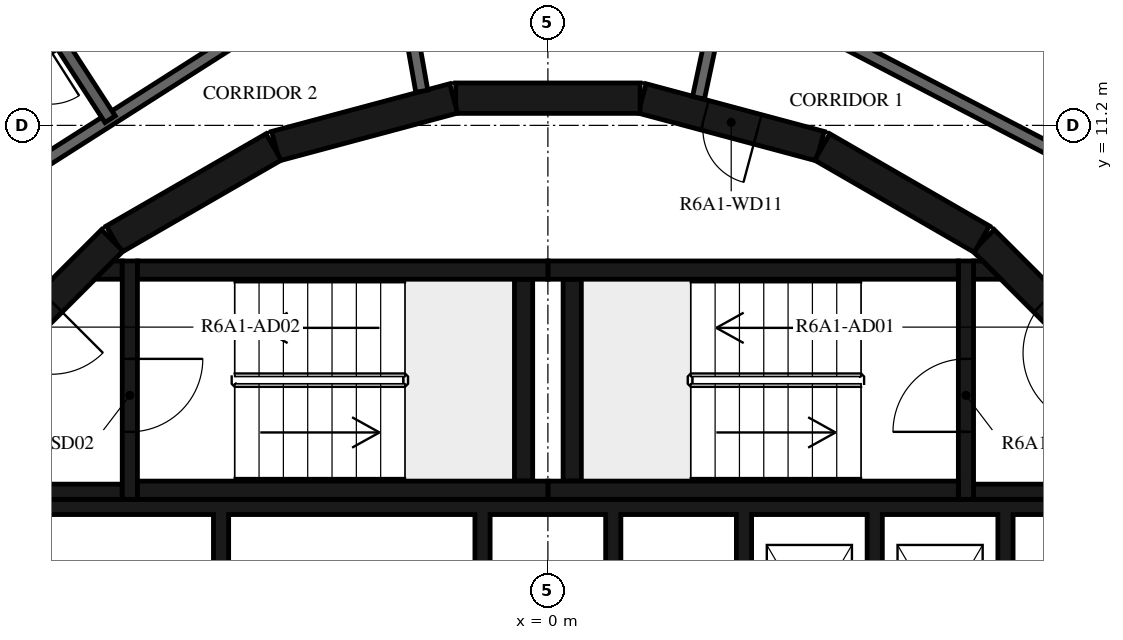
"""IFC4 building model, lengths in metres.
Left out: names, types, materials, properties, quantities, classifications, styles, units other than length and angle.
Written with IfcOpenShell. Run it as: python <this file> out.ifc"""

import sys

from ifc_helpers import new_model, si_unit, direction, frame, frame_2d, origin, place, context, subcontext, project, spatial, polyline, rectangle, outline, extrude, element, fill, save


model = new_model("IFC4")
c1 = context("Model", 3, precision=1e-05, world=origin(), true_north=direction((0.0, 1.0)))
c2 = subcontext(c1, "Body", "Model", "MODEL_VIEW")
j1 = project(units=[si_unit("LENGTHUNIT", "METRE"), si_unit("PLANEANGLEUNIT", "RADIAN")], contexts=[c1])
p1 = place(None, origin())
s1 = spatial("IfcSite", under=j1, at=p1, CompositionType="ELEMENT")
p2 = place(p1, origin())
s2 = spatial("IfcBuilding", under=s1, at=p2, CompositionType="ELEMENT")
p3 = place(p2, frame((0.0, 0.0, 230.2)))
s3 = spatial("IfcBuildingStorey", under=s2, at=p3, CompositionType="ELEMENT", Elevation=230.2)
p4 = place(p3, frame((9.308, 7.164, 0.0), z_axis=(0.0, 0.0, 1.0), x_axis=(-0.707106781187, 0.707106781187, 0.0)))
e1 = element("IfcWall", 1, at=p4, inside=s3, PredefinedType="SHEAR", context=c2, shape_type="SweptSolid", body=[
    extrude(rectangle(XDim=3.032, YDim=0.5, at=frame_2d((1.516, 0.0))), origin(), (0.0, 0.0, 1.0), 3.12),
])
p5 = place(p4, frame((0.416, 0.0, 0.0)))
e2 = element("IfcOpeningElement", 2, at=p5, cuts=e1, PredefinedType="OPENING", context=c2, shape_type="SweptSolid", body=[
    extrude(rectangle(XDim=1.2, YDim=2.1, at=frame_2d((0.6, 1.05))), frame((0.0, 0.26, 0.0), z_axis=(0.0, -1.0, 0.0), x_axis=(1.0, 0.0, 0.0)), (0.0, 0.0, 1.0), 0.52),
])
p6 = place(p3, frame((7.137, 9.329, 0.0), z_axis=(0.0, 0.0, 1.0), x_axis=(-0.865975092491, 0.500087131594, 0.0)))
e3 = element("IfcWall", 3, at=p6, inside=s3, PredefinedType="SHEAR", context=c2, shape_type="SweptSolid", body=[
    extrude(rectangle(XDim=3.033, YDim=0.5, at=frame_2d((1.516, 0.0))), origin(), (0.0, 0.0, 1.0), 3.12),
])
p7 = place(p3, frame((4.479, 10.858, 0.0), z_axis=(0.0, 0.0, 1.0), x_axis=(-0.965948410781, 0.258734743916, 0.0)))
e4 = element("IfcWall", 4, at=p7, inside=s3, PredefinedType="SHEAR", context=c2, shape_type="SweptSolid", body=[
    extrude(rectangle(XDim=3.033, YDim=0.5, at=frame_2d((1.516, 0.0))), origin(), (0.0, 0.0, 1.0), 3.12),
])
p8 = place(p7, frame((1.066, 0.0, 0.0)))
e5 = element("IfcOpeningElement", 5, at=p8, cuts=e4, PredefinedType="OPENING", context=c2, shape_type="SweptSolid", body=[
    extrude(rectangle(XDim=0.9, YDim=2.1, at=frame_2d((0.45, 1.05))), frame((0.0, 0.26, 0.0), z_axis=(0.0, -1.0, 0.0), x_axis=(1.0, 0.0, 0.0)), (0.0, 0.0, 1.0), 0.52),
])
for number, where, z_axis, x_axis in (
    (6, (1.516, 11.647, 0.0), (0.0, 0.0, 1.0), (-1.0, 0.0, 0.0)),
    (7, (-1.55, 11.643, 0.0), (0.0, 0.0, 1.0), (-0.966, -0.259, 0.0)),
    (8, (-4.51, 10.845, 0.0), (0.0, 0.0, 1.0), (-0.866, -0.5, 0.0)),
):
    element("IfcWall", number, at=place(p3, frame(where, z_axis=z_axis, x_axis=x_axis)), inside=s3, PredefinedType="SHEAR", context=c2, shape_type="SweptSolid", body=[
        extrude(rectangle(XDim=3.033, YDim=0.5, at=frame_2d((1.516, 0.0))), origin(), (0.0, 0.0, 1.0), 3.12),
    ])
p9 = place(p3, frame((-7.164, 9.308, 0.0), z_axis=(0.0, 0.0, 1.0), x_axis=(-0.707106781187, -0.707106781187, 0.0)))
e9 = element("IfcWall", 9, at=p9, inside=s3, PredefinedType="SHEAR", context=c2, shape_type="SweptSolid", body=[
    extrude(rectangle(XDim=3.032, YDim=0.5, at=frame_2d((1.516, 0.0))), origin(), (0.0, 0.0, 1.0), 3.12),
])
p10 = place(p9, frame((1.416, 0.0, 0.0)))
e10 = element("IfcOpeningElement", 10, at=p10, cuts=e9, PredefinedType="OPENING", context=c2, shape_type="SweptSolid", body=[
    extrude(rectangle(XDim=1.2, YDim=2.1, at=frame_2d((0.6, 1.05))), frame((0.0, 0.26, 0.0), z_axis=(0.0, -1.0, 0.0), x_axis=(1.0, 0.0, 0.0)), (0.0, 0.0, 1.0), 0.52),
])
for number, where, z_axis, x_axis in (
    (11, (0.0, 5.2, 0.0), (0.0, 0.0, 1.0), (1.0, 0.0, 0.0)),
    (12, (0.0, 8.82, 0.0), (0.0, 0.0, 1.0), (1.0, 0.0, 0.0)),
):
    element("IfcWall", number, at=place(p3, frame(where, z_axis=z_axis, x_axis=x_axis)), inside=s3, PredefinedType="SHEAR", context=c2, shape_type="SweptSolid", body=[
        extrude(rectangle(XDim=6.75, YDim=0.3, at=frame_2d((3.375, 0.0))), origin(), (0.0, 0.0, 1.0), 3.12),
    ])
p11 = place(p3, frame((0.4, 5.35, 0.0), z_axis=(0.0, 0.0, 1.0), x_axis=(0.0, 1.0, 0.0)))
e13 = element("IfcWall", 13, at=p11, inside=s3, PredefinedType="SHEAR", context=c2, shape_type="SweptSolid", body=[
    extrude(rectangle(XDim=3.32, YDim=0.3, at=frame_2d((1.66, 0.0))), origin(), (0.0, 0.0, 1.0), 3.12),
])
p12 = place(p3, frame((6.875, 5.05, 0.0), z_axis=(0.0, 0.0, 1.0), x_axis=(0.0, 1.0, 0.0)))
e14 = element("IfcWall", 14, at=p12, inside=s3, PredefinedType="SHEAR", context=c2, shape_type="SweptSolid", body=[
    extrude(rectangle(XDim=3.92, YDim=0.25, at=frame_2d((1.96, 0.0))), origin(), (0.0, 0.0, 1.0), 3.12),
])
p13 = place(p12, frame((1.11, 0.0, 0.0)))
e15 = element("IfcOpeningElement", 15, at=p13, cuts=e14, PredefinedType="OPENING", context=c2, shape_type="SweptSolid", body=[
    extrude(rectangle(XDim=1.2, YDim=2.1, at=frame_2d((0.6, 1.05))), frame((0.0, 0.135, 0.0), z_axis=(0.0, -1.0, 0.0), x_axis=(1.0, 0.0, 0.0)), (0.0, 0.0, 1.0), 0.27),
])
p14 = place(p3, frame((7.0, 5.175, 0.0), z_axis=(0.0, 0.0, 1.0), x_axis=(1.0, 0.0, 0.0)))
e16 = element("IfcWall", 16, at=p14, inside=s3, PredefinedType="SHEAR", context=c2, shape_type="SweptSolid", body=[
    extrude(rectangle(XDim=3.1, YDim=0.25, at=frame_2d((1.55, 0.0))), origin(), (0.0, 0.0, 1.0), 3.12),
])
p15 = place(p3, origin())
e17 = element("IfcWall", 17, at=p15, inside=s3, PredefinedType="SHEAR", context=c2, shape_type="SweptSolid", body=[
    extrude(outline(polyline([(7.448, 8.67), (7.0, 8.67), (7.0, 8.97), (7.148, 8.97), (7.448, 8.67)])), origin(), (0.0, 0.0, 1.0), 3.12),
])
for number, where, z_axis, x_axis in (
    (18, (-6.75, 5.2, 0.0), (0.0, 0.0, 1.0), (1.0, 0.0, 0.0)),
    (19, (-6.75, 8.82, 0.0), (0.0, 0.0, 1.0), (1.0, 0.0, 0.0)),
):
    element("IfcWall", number, at=place(p3, frame(where, z_axis=z_axis, x_axis=x_axis)), inside=s3, PredefinedType="SHEAR", context=c2, shape_type="SweptSolid", body=[
        extrude(rectangle(XDim=6.75, YDim=0.3, at=frame_2d((3.375, 0.0))), origin(), (0.0, 0.0, 1.0), 3.12),
    ])
p16 = place(p3, frame((-0.4, 5.35, 0.0), z_axis=(0.0, 0.0, 1.0), x_axis=(0.0, 1.0, 0.0)))
e20 = element("IfcWall", 20, at=p16, inside=s3, PredefinedType="SHEAR", context=c2, shape_type="SweptSolid", body=[
    extrude(rectangle(XDim=3.32, YDim=0.3, at=frame_2d((1.66, 0.0))), origin(), (0.0, 0.0, 1.0), 3.12),
])
p17 = place(p3, frame((-6.875, 8.97, 0.0), z_axis=(0.0, 0.0, 1.0), x_axis=(0.0, -1.0, 0.0)))
e21 = element("IfcWall", 21, at=p17, inside=s3, PredefinedType="SHEAR", context=c2, shape_type="SweptSolid", body=[
    extrude(rectangle(XDim=3.92, YDim=0.25, at=frame_2d((1.96, 0.0))), origin(), (0.0, 0.0, 1.0), 3.12),
])
p18 = place(p17, frame((1.61, 0.0, 0.0)))
e22 = element("IfcOpeningElement", 22, at=p18, cuts=e21, PredefinedType="OPENING", context=c2, shape_type="SweptSolid", body=[
    extrude(rectangle(XDim=1.2, YDim=2.1, at=frame_2d((0.6, 1.05))), frame((0.0, 0.135, 0.0), z_axis=(0.0, -1.0, 0.0), x_axis=(1.0, 0.0, 0.0)), (0.0, 0.0, 1.0), 0.27),
])
p19 = place(p3, frame((-7.0, 5.175, 0.0), z_axis=(0.0, 0.0, 1.0), x_axis=(-1.0, 0.0, 0.0)))
e23 = element("IfcWall", 23, at=p19, inside=s3, PredefinedType="SHEAR", context=c2, shape_type="SweptSolid", body=[
    extrude(rectangle(XDim=3.1, YDim=0.25, at=frame_2d((1.55, 0.0))), origin(), (0.0, 0.0, 1.0), 3.12),
])
p20 = place(p3, origin())
e24 = element("IfcWall", 24, at=p20, inside=s3, PredefinedType="SHEAR", context=c2, shape_type="SweptSolid", body=[
    extrude(outline(polyline([(-7.148, 8.97), (-7.0, 8.97), (-7.0, 8.67), (-7.448, 8.67), (-7.148, 8.97)])), origin(), (0.0, 0.0, 1.0), 3.12),
])
p21 = place(p3, origin())
e25 = element("IfcWall", 25, at=p21, inside=s3, PredefinedType="SHEAR", context=c2, shape_type="SweptSolid", body=[
    extrude(outline(polyline([(-9.55, 4.8), (-5.5, 4.8), (-5.5, 1.9), (-5.25, 1.9), (-5.25, 4.8), (-1.2, 4.8), (-1.2, 1.9), (-0.95, 1.9), (-0.95, 4.8), (0.95, 4.8), (0.95, 1.9), (1.2, 1.9), (1.2, 4.8), (3.1, 4.8), (3.1, 1.9), (3.35, 1.9), (3.35, 4.8), (5.25, 4.8), (5.25, 1.9), (5.5, 1.9), (5.5, 4.8), (7.4, 4.8), (7.4, 1.9), (7.65, 1.9), (7.65, 4.8), (9.55, 4.8), (9.55, 1.9), (9.8, 1.9), (9.8, 4.8), (9.8, 5.05), (-9.8, 5.05), (-9.8, 4.8), (-9.8, 1.9), (-9.55, 1.9), (-9.55, 4.8)])), origin(), (0.0, 0.0, 1.0), 3.12),
])
p22 = place(p3, frame((9.372, 10.228, 0.0), z_axis=(0.0, 0.0, 1.0), x_axis=(-0.887005184532, 0.461759464021, 0.0)))
e26 = element("IfcWall", 26, at=p22, inside=s3, PredefinedType="STANDARD", context=c2, shape_type="SweptSolid", body=[
    extrude(rectangle(XDim=7.181, YDim=0.2, at=frame_2d((3.591, 0.0))), origin(), (0.0, 0.0, 1.0), 3.12),
])
p23 = place(p3, frame((2.878, 13.538, 0.0), z_axis=(0.0, 0.0, 1.0), x_axis=(-0.207893604596, -0.978151444904, 0.0)))
e27 = element("IfcWall", 27, at=p23, inside=s3, PredefinedType="STANDARD", context=c2, shape_type="SweptSolid", body=[
    extrude(rectangle(XDim=1.927, YDim=0.2, at=frame_2d((0.963, 0.0))), origin(), (0.0, 0.0, 1.0), 3.12),
])
p24 = place(p3, frame((-2.074, 11.761, 0.0), z_axis=(0.0, 0.0, 1.0), x_axis=(-0.173679082312, 0.984802303189, 0.0)))
e28 = element("IfcWall", 28, at=p24, inside=s3, PredefinedType="STANDARD", context=c2, shape_type="SweptSolid", body=[
    extrude(rectangle(XDim=1.573, YDim=0.2, at=frame_2d((0.787, 0.0))), origin(), (0.0, 0.0, 1.0), 3.12),
])
p25 = place(p3, frame((-4.172, 13.231, 0.0), z_axis=(0.0, 0.0, 1.0), x_axis=(-0.843388394728, -0.537304397561, 0.0)))
e29 = element("IfcWall", 29, at=p25, inside=s3, PredefinedType="STANDARD", context=c2, shape_type="SweptSolid", body=[
    extrude(rectangle(XDim=7.181, YDim=0.2, at=frame_2d((3.59, 0.0))), origin(), (0.0, 0.0, 1.0), 3.12),
])
p26 = place(p3, frame((-8.738, 13.677, 0.0), z_axis=(0.0, 0.0, 1.0), x_axis=(0.54358037296, -0.839357121929, 0.0)))
e30 = element("IfcWall", 30, at=p26, inside=s3, PredefinedType="STANDARD", context=c2, shape_type="SweptSolid", body=[
    extrude(rectangle(XDim=2.83, YDim=0.2, at=frame_2d((1.415, 0.0))), origin(), (0.0, 0.0, 1.0), 3.12),
])
p27 = place(p3, frame((10.421, 11.373, 0.0), z_axis=(0.0, 0.0, 1.0), x_axis=(-0.887012970857, 0.461744506769, 0.0)))
e31 = element("IfcWall", 31, at=p27, inside=s3, PredefinedType="PARTITIONING", context=c2, shape_type="SweptSolid", body=[
    extrude(rectangle(XDim=7.985, YDim=0.12, at=frame_2d((3.992, 0.0))), origin(), (0.0, 0.0, 1.0), 3.12),
])
p28 = place(p27, frame((5.448, 0.0, 0.0)))
e32 = element("IfcOpeningElement", 32, at=p28, cuts=e31, PredefinedType="OPENING", context=c2, shape_type="SweptSolid", body=[
    extrude(rectangle(XDim=0.9, YDim=2.1, at=frame_2d((0.45, 1.05))), frame((0.0, 0.07, 0.0), z_axis=(0.0, -1.0, 0.0), x_axis=(1.0, 0.0, 0.0)), (0.0, 0.0, 1.0), 0.14),
])
p29 = place(p3, frame((-8.023, 12.555, 0.0), z_axis=(0.0, 0.0, 1.0), x_axis=(-0.843408270233, -0.537273198385, 0.0)))
e33 = element("IfcWall", 33, at=p29, inside=s3, PredefinedType="PARTITIONING", context=c2, shape_type="SweptSolid", body=[
    extrude(rectangle(XDim=3.971, YDim=0.12, at=frame_2d((1.986, 0.0))), origin(), (0.0, 0.0, 1.0), 3.12),
])
p30 = place(p29, frame((0.2, 0.0, 0.0)))
e34 = element("IfcOpeningElement", 34, at=p30, cuts=e33, PredefinedType="OPENING", context=c2, shape_type="SweptSolid", body=[
    extrude(rectangle(XDim=0.9, YDim=2.1, at=frame_2d((0.45, 1.05))), frame((0.0, 0.07, 0.0), z_axis=(0.0, -1.0, 0.0), x_axis=(1.0, 0.0, 0.0)), (0.0, 0.0, 1.0), 0.14),
])
p31 = place(p13, origin())
e35 = element("IfcDoor", 35, at=p31, inside=s3, OperationType="SINGLE_SWING_LEFT", PredefinedType="DOOR", context=c2, shape_type="SweptSolid", body=[
    extrude(rectangle(XDim=1.2, YDim=2.1, at=frame_2d((0.6, 1.05))), frame((0.0, 0.025, 0.0), z_axis=(0.0, -1.0, 0.0), x_axis=(1.0, 0.0, 0.0)), (0.0, 0.0, 1.0), 0.05),
])
fill(e15, e35)
p32 = place(p5, origin())
e36 = element("IfcDoor", 36, at=p32, inside=s3, OperationType="SINGLE_SWING_RIGHT", PredefinedType="DOOR", context=c2, shape_type="SweptSolid", body=[
    extrude(rectangle(XDim=1.2, YDim=2.1, at=frame_2d((0.6, 1.05))), frame((0.0, 0.025, 0.0), z_axis=(0.0, -1.0, 0.0), x_axis=(1.0, 0.0, 0.0)), (0.0, 0.0, 1.0), 0.05),
])
fill(e2, e36)
p33 = place(p18, origin())
e37 = element("IfcDoor", 37, at=p33, inside=s3, OperationType="SINGLE_SWING_LEFT", PredefinedType="DOOR", context=c2, shape_type="SweptSolid", body=[
    extrude(rectangle(XDim=1.2, YDim=2.1, at=frame_2d((0.6, 1.05))), frame((0.0, 0.025, 0.0), z_axis=(0.0, -1.0, 0.0), x_axis=(1.0, 0.0, 0.0)), (0.0, 0.0, 1.0), 0.05),
])
fill(e22, e37)
p34 = place(p10, origin())
e38 = element("IfcDoor", 38, at=p34, inside=s3, OperationType="SINGLE_SWING_RIGHT", PredefinedType="DOOR", context=c2, shape_type="SweptSolid", body=[
    extrude(rectangle(XDim=1.2, YDim=2.1, at=frame_2d((0.6, 1.05))), frame((0.0, 0.025, 0.0), z_axis=(0.0, -1.0, 0.0), x_axis=(1.0, 0.0, 0.0)), (0.0, 0.0, 1.0), 0.05),
])
fill(e10, e38)
p35 = place(p8, origin())
e39 = element("IfcDoor", 39, at=p35, inside=s3, OperationType="SINGLE_SWING_LEFT", PredefinedType="DOOR", context=c2, shape_type="SweptSolid", body=[
    extrude(rectangle(XDim=0.9, YDim=2.1, at=frame_2d((0.45, 1.05))), frame((0.0, 0.025, 0.0), z_axis=(0.0, -1.0, 0.0), x_axis=(1.0, 0.0, 0.0)), (0.0, 0.0, 1.0), 0.05),
])
fill(e5, e39)
save(model, sys.argv[1])
